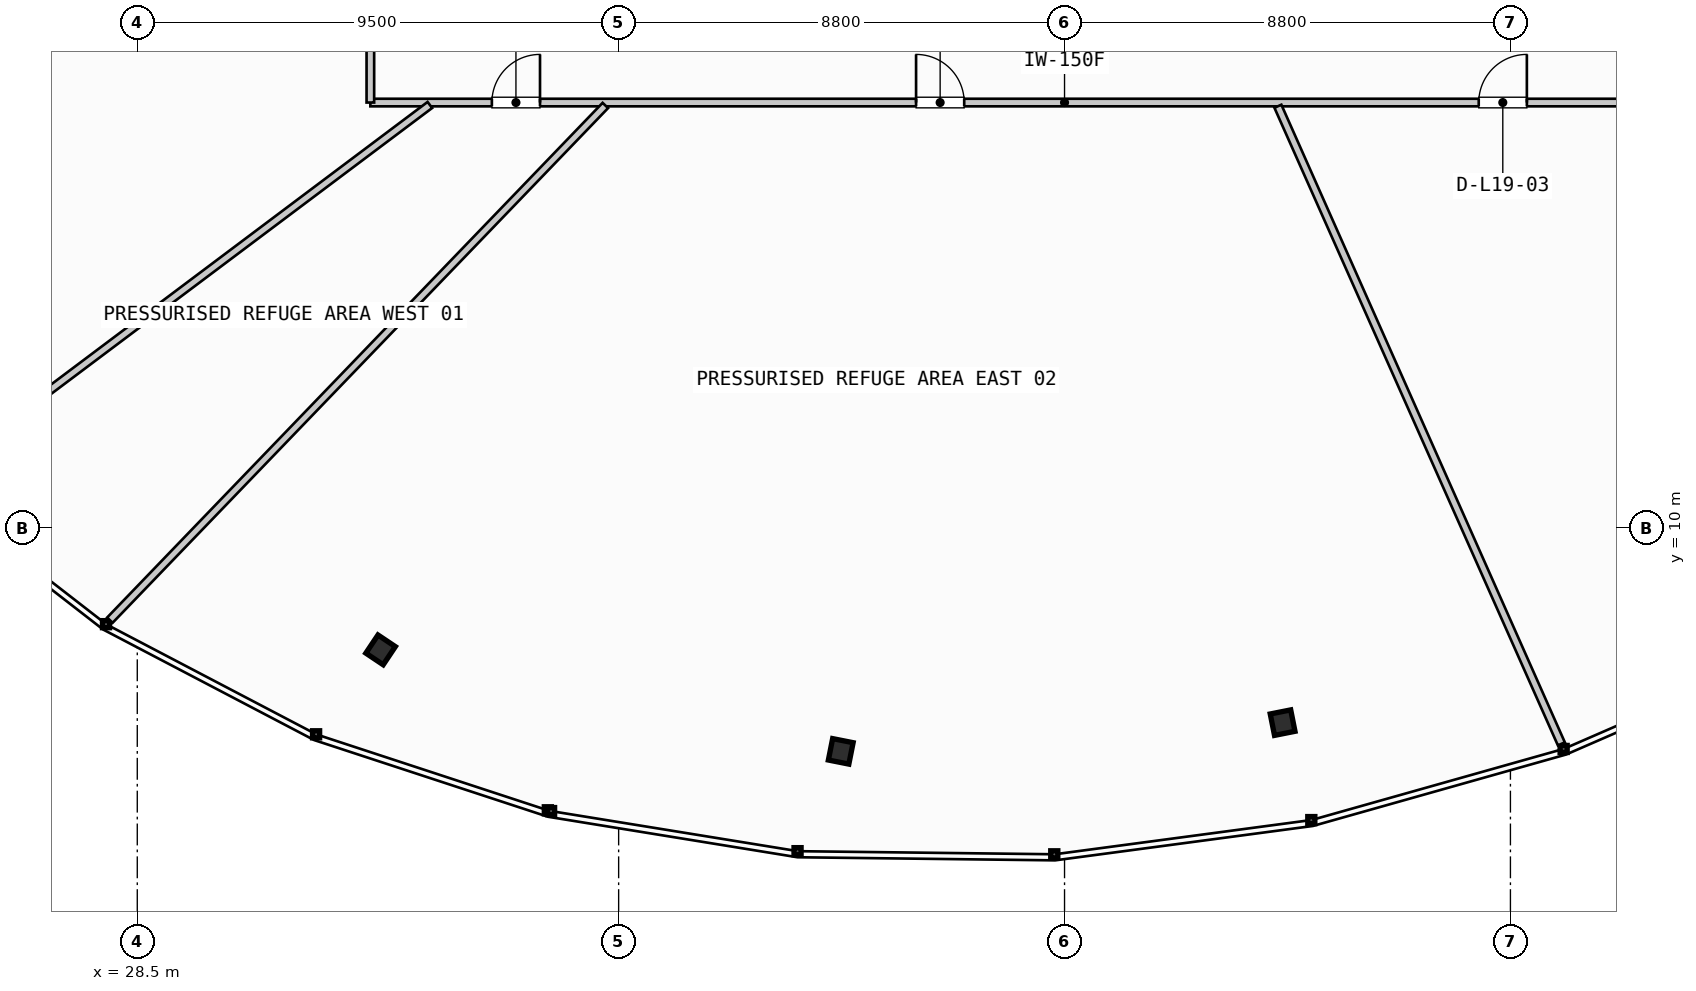
"""IFC4 building model, lengths in metres.
Left out: names, types, materials, properties, quantities, classifications, styles, units other than length and angle.
Written with IfcOpenShell. Run it as: python <this file> out.ifc"""

import sys

from ifc_helpers import new_model, si_unit, direction, frame, frame_2d, origin, origin_2d, place, context, subcontext, project, spatial, rectangle, i_section, extrude, source, transform, mapped, element, fill, save


model = new_model("IFC4")
c1 = context("Model", 3, precision=1e-05, world=origin(), true_north=direction((0.0, 1.0)))
c2 = subcontext(c1, "Body", "Model", "MODEL_VIEW")
j1 = project(units=[si_unit("LENGTHUNIT", "METRE"), si_unit("PLANEANGLEUNIT", "RADIAN")], contexts=[c1])
p1 = place(None, origin())
s1 = spatial("IfcSite", under=j1, at=p1, CompositionType="ELEMENT")
p2 = place(p1, origin())
s2 = spatial("IfcBuilding", under=s1, at=p2, CompositionType="ELEMENT")
p3 = place(p2, frame((0.0, 0.0, 80.4)))
s3 = spatial("IfcBuildingStorey", under=s2, at=p3, CompositionType="ELEMENT", Elevation=80.4)
m1 = source(origin(), c2, "Body", "SweptSolid", [
    extrude(i_section(OverallWidth=0.412, OverallDepth=0.431, WebThickness=0.042, FlangeThickness=0.068, FilletRadius=0.015, at=origin_2d()), origin(), (0.0, 0.0, 1.0), 4.76),
])
for number, where, z_axis, x_axis in (
    (1, (33.302, 7.599, 0.0), (0.0, 0.0, 1.0), (-0.556, -0.831, 0.0)),
    (2, (42.383, 5.596, 0.0), (0.0, 0.0, 1.0), (-0.195, -0.981, 0.0)),
    (3, (51.104, 6.163, 0.0), (0.0, 0.0, 1.0), (0.195, -0.981, 0.0)),
):
    element("IfcColumn", number, at=place(p3, frame(where, z_axis=z_axis, x_axis=x_axis)), inside=s3, PredefinedType="COLUMN", context=c2, shape_type="MappedRepresentation", body=[
        mapped(m1, transform((0.0, 0.0, 0.0), scale=1.0)),
    ])
p4 = place(p3, frame((33.1, 18.4, 0.0), z_axis=(0.0, 0.0, 1.0), x_axis=(1.0, 0.0, 0.0)))
e4 = element("IfcWall", 4, at=p4, inside=s3, PredefinedType="PARTITIONING", context=c2, shape_type="SweptSolid", body=[
    extrude(rectangle(XDim=27.4, YDim=0.15, at=frame_2d((13.7, 0.0))), origin(), (0.0, 0.0, 1.0), 2.335),
])
p5 = place(p4, frame((2.398, 0.0, 0.0)))
e5 = element("IfcOpeningElement", 5, at=p5, cuts=e4, PredefinedType="OPENING", context=c2, shape_type="SweptSolid", body=[
    extrude(rectangle(XDim=0.95, YDim=2.15, at=frame_2d((0.475, 1.075))), frame((0.0, 0.085, 0.0), z_axis=(0.0, -1.0, 0.0), x_axis=(1.0, 0.0, 0.0)), (0.0, 0.0, 1.0), 0.17),
])
p6 = place(p4, frame((10.77, 0.0, 0.0)))
e6 = element("IfcOpeningElement", 6, at=p6, cuts=e4, PredefinedType="OPENING", context=c2, shape_type="SweptSolid", body=[
    extrude(rectangle(XDim=0.95, YDim=2.15, at=frame_2d((0.475, 1.075))), frame((0.0, 0.085, 0.0), z_axis=(0.0, -1.0, 0.0), x_axis=(1.0, 0.0, 0.0)), (0.0, 0.0, 1.0), 0.17),
])
p7 = place(p4, frame((21.875, 0.0, 0.0)))
e7 = element("IfcOpeningElement", 7, at=p7, cuts=e4, PredefinedType="OPENING", context=c2, shape_type="SweptSolid", body=[
    extrude(rectangle(XDim=0.95, YDim=2.15, at=frame_2d((0.475, 1.075))), frame((0.0, 0.085, 0.0), z_axis=(0.0, -1.0, 0.0), x_axis=(1.0, 0.0, 0.0)), (0.0, 0.0, 1.0), 0.17),
])
p8 = place(p3, frame((33.1, 37.2, 0.0), z_axis=(0.0, 0.0, 1.0), x_axis=(0.0, -1.0, 0.0)))
e8 = element("IfcWall", 8, at=p8, inside=s3, PredefinedType="PARTITIONING", context=c2, shape_type="SweptSolid", body=[
    extrude(rectangle(XDim=18.8, YDim=0.15, at=frame_2d((9.4, 0.0))), origin(), (0.0, 0.0, 1.0), 2.335),
])
p9 = place(p8, frame((5.441, 0.0, 0.0)))
e9 = element("IfcOpeningElement", 9, at=p9, cuts=e8, PredefinedType="OPENING", context=c2, shape_type="SweptSolid", body=[
    extrude(rectangle(XDim=0.95, YDim=2.15, at=frame_2d((0.475, 1.075))), frame((0.0, 0.085, 0.0), z_axis=(0.0, -1.0, 0.0), x_axis=(1.0, 0.0, 0.0)), (0.0, 0.0, 1.0), 0.17),
])
p10 = place(p8, frame((12.746, 0.0, 0.0)))
e10 = element("IfcOpeningElement", 10, at=p10, cuts=e8, PredefinedType="OPENING", context=c2, shape_type="SweptSolid", body=[
    extrude(rectangle(XDim=0.95, YDim=2.15, at=frame_2d((0.475, 1.075))), frame((0.0, 0.085, 0.0), z_axis=(0.0, -1.0, 0.0), x_axis=(1.0, 0.0, 0.0)), (0.0, 0.0, 1.0), 0.17),
])
p11 = place(p3, frame((34.274, 18.352, 0.0), z_axis=(0.0, 0.0, 1.0), x_axis=(-0.799838579298, -0.600215167308, 0.0)))
e11 = element("IfcWall", 11, at=p11, inside=s3, PredefinedType="PARTITIONING", context=c2, shape_type="SweptSolid", body=[
    extrude(rectangle(XDim=12.344, YDim=0.15, at=frame_2d((6.172, 0.0))), origin(), (0.0, 0.0, 1.0), 2.335),
])
p12 = place(p3, frame((37.738, 18.342, 0.0), z_axis=(0.0, 0.0, 1.0), x_axis=(-0.693541516042, -0.720416661055, 0.0)))
e12 = element("IfcWall", 12, at=p12, inside=s3, PredefinedType="PARTITIONING", context=c2, shape_type="SweptSolid", body=[
    extrude(rectangle(XDim=14.099, YDim=0.15, at=frame_2d((7.049, 0.0))), origin(), (0.0, 0.0, 1.0), 2.335),
])
p13 = place(p3, frame((51.011, 18.327, 0.0), z_axis=(0.0, 0.0, 1.0), x_axis=(0.406247031728, -0.913763289486, 0.0)))
e13 = element("IfcWall", 13, at=p13, inside=s3, PredefinedType="PARTITIONING", context=c2, shape_type="SweptSolid", body=[
    extrude(rectangle(XDim=13.771, YDim=0.15, at=frame_2d((6.885, 0.0))), origin(), (0.0, 0.0, 1.0), 2.335),
])
m2 = source(origin(), c2, "Body", "SweptSolid", [
    extrude(rectangle(XDim=0.95, YDim=2.15, at=frame_2d((0.475, 1.075))), frame((0.0, 0.025, 0.0), z_axis=(0.0, -1.0, 0.0), x_axis=(1.0, 0.0, 0.0)), (0.0, 0.0, 1.0), 0.05),
])
p14 = place(p5, origin())
e14 = element("IfcDoor", 14, at=p14, inside=s3, OperationType="SINGLE_SWING_RIGHT", PredefinedType="DOOR", context=c2, shape_type="MappedRepresentation", body=[
    mapped(m2, transform((0.0, 0.0, 0.0), scale=1.0)),
])
fill(e5, e14)
p15 = place(p6, origin())
e15 = element("IfcDoor", 15, at=p15, inside=s3, OperationType="SINGLE_SWING_LEFT", PredefinedType="DOOR", context=c2, shape_type="MappedRepresentation", body=[
    mapped(m2, transform((0.0, 0.0, 0.0), scale=1.0)),
])
fill(e6, e15)
p16 = place(p7, origin())
e16 = element("IfcDoor", 16, at=p16, inside=s3, OperationType="SINGLE_SWING_RIGHT", PredefinedType="DOOR", context=c2, shape_type="MappedRepresentation", body=[
    mapped(m2, transform((0.0, 0.0, 0.0), scale=1.0)),
])
fill(e7, e16)
save(model, sys.argv[1])
